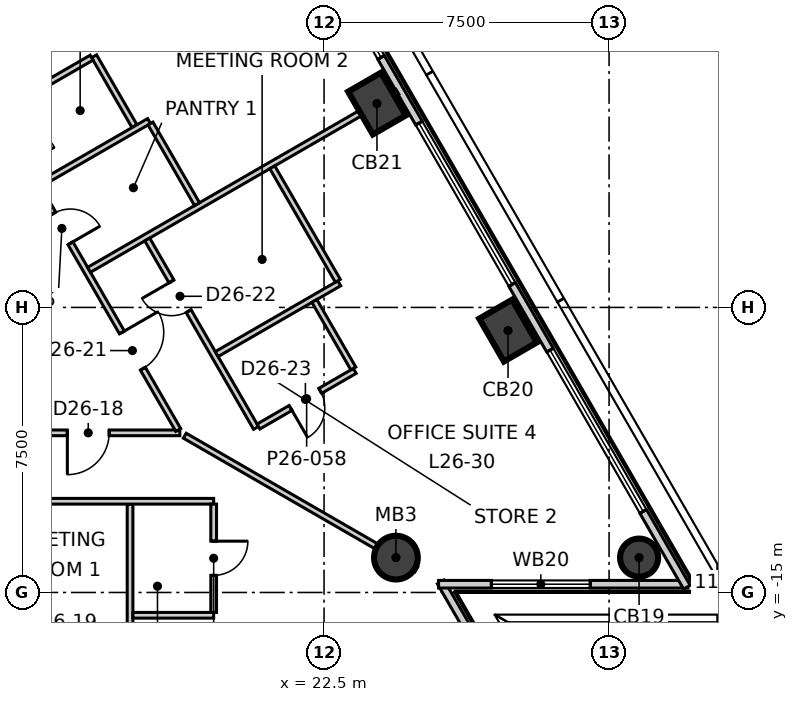
"""IFC4 building model, lengths in metres.
Left out: names, types, materials, properties, quantities, classifications, styles, units other than length and angle.
Written with IfcOpenShell. Run it as: python <this file> out.ifc"""

import sys

from ifc_helpers import new_model, si_unit, direction, frame, frame_2d, origin, origin_2d, place, context, subcontext, project, spatial, rectangle, circle, extrude, element, fill, save


model = new_model("IFC4")
c1 = context("Model", 3, precision=1e-05, world=origin(), true_north=direction((0.0, 1.0)))
c2 = subcontext(c1, "Body", "Model", "MODEL_VIEW")
j1 = project(units=[si_unit("LENGTHUNIT", "METRE"), si_unit("PLANEANGLEUNIT", "RADIAN")], contexts=[c1])
p1 = place(None, origin())
s1 = spatial("IfcSite", under=j1, at=p1, CompositionType="ELEMENT")
p2 = place(p1, origin())
s2 = spatial("IfcBuilding", under=s1, at=p2, CompositionType="ELEMENT")
p3 = place(p2, frame((0.0, 0.0, 116.3)))
s3 = spatial("IfcBuildingStorey", under=s2, at=p3, CompositionType="ELEMENT", Elevation=116.3)
p4 = place(p3, frame((30.79, -14.083, -0.3), z_axis=(0.0, 0.0, 1.0), x_axis=(-0.5, 0.866025403784, 0.0)))
e1 = element("IfcColumn", 1, at=p4, inside=s3, PredefinedType="COLUMN", context=c2, shape_type="SweptSolid", body=[
    extrude(circle(Radius=0.5, at=origin_2d()), origin(), (0.0, 0.0, 1.0), 4.0),
])
for number, where, z_axis, x_axis in (
    (2, (27.341, -8.109, -0.3), (0.0, 0.0, 1.0), (-0.5, 0.866, 0.0)),
    (3, (23.892, -2.136, -0.3), (0.0, 0.0, 1.0), (-0.5, 0.866, 0.0)),
):
    element("IfcColumn", number, at=place(p3, frame(where, z_axis=z_axis, x_axis=x_axis)), inside=s3, PredefinedType="COLUMN", context=c2, shape_type="SweptSolid", body=[
        extrude(rectangle(XDim=1.3, YDim=1.0, at=origin_2d()), origin(), (0.0, 0.0, 1.0), 4.0),
    ])
p5 = place(p3, frame((24.391, -14.083, -0.3), z_axis=(0.0, 0.0, 1.0), x_axis=(1.0, 0.0, 0.0)))
e4 = element("IfcColumn", 4, at=p5, inside=s3, PredefinedType="COLUMN", context=c2, shape_type="SweptSolid", body=[
    extrude(circle(Radius=0.575, at=origin_2d()), origin(), (0.0, 0.0, 1.0), 4.0),
])
p6 = place(p3, frame((28.849, -20.402, 0.0), z_axis=(0.0, 0.0, 1.0), x_axis=(-0.500066121085, 0.865987225393, 0.0)))
e5 = element("IfcWall", 5, at=p6, inside=s3, PredefinedType="ELEMENTEDWALL", context=c2, shape_type="SweptSolid", body=[
    extrude(rectangle(XDim=6.559, YDim=0.2, at=frame_2d((3.28, 0.0))), origin(), (0.0, 0.0, 1.0), 3.7),
])
p7 = place(p6, frame((1.99, 0.0, 0.9)))
e6 = element("IfcOpeningElement", 6, at=p7, cuts=e5, PredefinedType="OPENING", context=c2, shape_type="SweptSolid", body=[
    extrude(rectangle(XDim=2.6, YDim=2.5, at=frame_2d((1.3, 1.25))), frame((0.0, 0.11, 0.0), z_axis=(0.0, -1.0, 0.0), x_axis=(1.0, 0.0, 0.0)), (0.0, 0.0, 1.0), 0.22),
])
p8 = place(p3, frame((25.514, -14.783, 0.0), z_axis=(0.0, 0.0, 1.0), x_axis=(1.0, 0.0, 0.0)))
e7 = element("IfcWall", 7, at=p8, inside=s3, PredefinedType="ELEMENTEDWALL", context=c2, shape_type="SweptSolid", body=[
    extrude(rectangle(XDim=6.559, YDim=0.2, at=frame_2d((3.28, 0.0))), origin(), (0.0, 0.0, 1.0), 3.7),
])
p9 = place(p8, frame((1.39, 0.0, 0.9)))
e8 = element("IfcOpeningElement", 8, at=p9, cuts=e7, PredefinedType="OPENING", context=c2, shape_type="SweptSolid", body=[
    extrude(rectangle(XDim=2.6, YDim=2.5, at=frame_2d((1.3, 1.25))), frame((0.0, 0.11, 0.0), z_axis=(0.0, -1.0, 0.0), x_axis=(1.0, 0.0, 0.0)), (0.0, 0.0, 1.0), 0.22),
])
p10 = place(p3, frame((32.048, -14.861, 0.0), z_axis=(0.0, 0.0, 1.0), x_axis=(-0.499996704161, 0.866027306629, 0.0)))
e9 = element("IfcWall", 9, at=p10, inside=s3, PredefinedType="ELEMENTEDWALL", context=c2, shape_type="SweptSolid", body=[
    extrude(rectangle(XDim=57.769, YDim=0.2, at=frame_2d((28.884, 0.0))), origin(), (0.0, 0.0, 1.0), 3.7),
])
p11 = place(p10, frame((2.302, 0.0, 0.9)))
e10 = element("IfcOpeningElement", 10, at=p11, cuts=e9, PredefinedType="OPENING", context=c2, shape_type="SweptSolid", body=[
    extrude(rectangle(XDim=4.9, YDim=2.5, at=frame_2d((2.45, 1.25))), frame((0.0, 0.11, 0.0), z_axis=(0.0, -1.0, 0.0), x_axis=(1.0, 0.0, 0.0)), (0.0, 0.0, 1.0), 0.22),
])
p12 = place(p10, frame((9.199, 0.0, 0.9)))
e11 = element("IfcOpeningElement", 11, at=p12, cuts=e9, PredefinedType="OPENING", context=c2, shape_type="SweptSolid", body=[
    extrude(rectangle(XDim=4.9, YDim=2.5, at=frame_2d((2.45, 1.25))), frame((0.0, 0.11, 0.0), z_axis=(0.0, -1.0, 0.0), x_axis=(1.0, 0.0, 0.0)), (0.0, 0.0, 1.0), 0.22),
])
p13 = place(p10, frame((16.097, 0.0, 0.9)))
e12 = element("IfcOpeningElement", 12, at=p13, cuts=e9, PredefinedType="OPENING", context=c2, shape_type="SweptSolid", body=[
    extrude(rectangle(XDim=4.9, YDim=2.5, at=frame_2d((2.45, 1.25))), frame((0.0, 0.11, 0.0), z_axis=(0.0, -1.0, 0.0), x_axis=(1.0, 0.0, 0.0)), (0.0, 0.0, 1.0), 0.22),
])
p14 = place(p10, frame((22.995, 0.0, 0.9)))
e13 = element("IfcOpeningElement", 13, at=p14, cuts=e9, PredefinedType="OPENING", context=c2, shape_type="SweptSolid", body=[
    extrude(rectangle(XDim=4.9, YDim=2.5, at=frame_2d((2.45, 1.25))), frame((0.0, 0.11, 0.0), z_axis=(0.0, -1.0, 0.0), x_axis=(1.0, 0.0, 0.0)), (0.0, 0.0, 1.0), 0.22),
])
p15 = place(p10, frame((29.893, 0.0, 0.9)))
e14 = element("IfcOpeningElement", 14, at=p15, cuts=e9, PredefinedType="OPENING", context=c2, shape_type="SweptSolid", body=[
    extrude(rectangle(XDim=4.9, YDim=2.5, at=frame_2d((2.45, 1.25))), frame((0.0, 0.11, 0.0), z_axis=(0.0, -1.0, 0.0), x_axis=(1.0, 0.0, 0.0)), (0.0, 0.0, 1.0), 0.22),
])
p16 = place(p10, frame((36.791, 0.0, 0.9)))
e15 = element("IfcOpeningElement", 15, at=p16, cuts=e9, PredefinedType="OPENING", context=c2, shape_type="SweptSolid", body=[
    extrude(rectangle(XDim=4.9, YDim=2.5, at=frame_2d((2.45, 1.25))), frame((0.0, 0.11, 0.0), z_axis=(0.0, -1.0, 0.0), x_axis=(1.0, 0.0, 0.0)), (0.0, 0.0, 1.0), 0.22),
])
p17 = place(p10, frame((43.689, 0.0, 0.9)))
e16 = element("IfcOpeningElement", 16, at=p17, cuts=e9, PredefinedType="OPENING", context=c2, shape_type="SweptSolid", body=[
    extrude(rectangle(XDim=4.9, YDim=2.5, at=frame_2d((2.45, 1.25))), frame((0.0, 0.11, 0.0), z_axis=(0.0, -1.0, 0.0), x_axis=(1.0, 0.0, 0.0)), (0.0, 0.0, 1.0), 0.22),
])
p18 = place(p10, frame((50.587, 0.0, 0.9)))
e17 = element("IfcOpeningElement", 17, at=p18, cuts=e9, PredefinedType="OPENING", context=c2, shape_type="SweptSolid", body=[
    extrude(rectangle(XDim=4.9, YDim=2.5, at=frame_2d((2.45, 1.25))), frame((0.0, 0.11, 0.0), z_axis=(0.0, -1.0, 0.0), x_axis=(1.0, 0.0, 0.0)), (0.0, 0.0, 1.0), 0.22),
])
p19 = place(p3, frame((0.901, -10.8, 0.0), z_axis=(0.0, 0.0, 1.0), x_axis=(1.0, 0.0, 0.0)))
e18 = element("IfcWall", 18, at=p19, inside=s3, PredefinedType="PARTITIONING", context=c2, shape_type="SweptSolid", body=[
    extrude(rectangle(XDim=17.804, YDim=0.15, at=frame_2d((8.902, 0.0))), origin(), (0.0, 0.0, 1.0), 3.7),
])
p20 = place(p19, frame((5.849, 0.0, 0.0)))
e19 = element("IfcOpeningElement", 19, at=p20, cuts=e18, PredefinedType="OPENING", context=c2, shape_type="SweptSolid", body=[
    extrude(rectangle(XDim=1.1, YDim=2.1, at=frame_2d((0.55, 1.05))), frame((0.0, 0.085, 0.0), z_axis=(0.0, -1.0, 0.0), x_axis=(1.0, 0.0, 0.0)), (0.0, 0.0, 1.0), 0.17),
])
p21 = place(p19, frame((14.844, 0.0, 0.0)))
e20 = element("IfcOpeningElement", 20, at=p21, cuts=e18, PredefinedType="OPENING", context=c2, shape_type="SweptSolid", body=[
    extrude(rectangle(XDim=1.1, YDim=2.1, at=frame_2d((0.55, 1.05))), frame((0.0, 0.085, 0.0), z_axis=(0.0, -1.0, 0.0), x_axis=(1.0, 0.0, 0.0)), (0.0, 0.0, 1.0), 0.17),
])
p22 = place(p3, frame((9.803, 4.62, 0.0), z_axis=(0.0, 0.0, 1.0), x_axis=(0.500023004316, -0.866012121829, 0.0)))
e21 = element("IfcWall", 21, at=p22, inside=s3, PredefinedType="PARTITIONING", context=c2, shape_type="SweptSolid", body=[
    extrude(rectangle(XDim=17.719, YDim=0.15, at=frame_2d((8.86, 0.0))), origin(), (0.0, 0.0, 1.0), 3.7),
])
p23 = place(p22, frame((14.756, 0.0, 0.0)))
e22 = element("IfcOpeningElement", 22, at=p23, cuts=e21, PredefinedType="OPENING", context=c2, shape_type="SweptSolid", body=[
    extrude(rectangle(XDim=1.1, YDim=2.1, at=frame_2d((0.55, 1.05))), frame((0.0, 0.085, 0.0), z_axis=(0.0, -1.0, 0.0), x_axis=(1.0, 0.0, 0.0)), (0.0, 0.0, 1.0), 0.17),
])
p24 = place(p22, frame((4.645, 0.0, 0.0)))
e23 = element("IfcOpeningElement", 23, at=p24, cuts=e21, PredefinedType="OPENING", context=c2, shape_type="SweptSolid", body=[
    extrude(rectangle(XDim=1.1, YDim=2.1, at=frame_2d((0.55, 1.05))), frame((0.0, 0.085, 0.0), z_axis=(0.0, -1.0, 0.0), x_axis=(1.0, 0.0, 0.0)), (0.0, 0.0, 1.0), 0.17),
])
p25 = place(p22, frame((11.145, 0.0, 0.0)))
e24 = element("IfcOpeningElement", 24, at=p25, cuts=e21, PredefinedType="OPENING", context=c2, shape_type="SweptSolid", body=[
    extrude(rectangle(XDim=0.9, YDim=2.1, at=frame_2d((0.45, 1.05))), frame((0.0, 0.085, 0.0), z_axis=(0.0, -1.0, 0.0), x_axis=(1.0, 0.0, 0.0)), (0.0, 0.0, 1.0), 0.17),
])
p26 = place(p22, frame((8.745, 0.0, 0.0)))
e25 = element("IfcOpeningElement", 25, at=p26, cuts=e21, PredefinedType="OPENING", context=c2, shape_type="SweptSolid", body=[
    extrude(rectangle(XDim=0.9, YDim=2.1, at=frame_2d((0.45, 1.05))), frame((0.0, 0.085, 0.0), z_axis=(0.0, -1.0, 0.0), x_axis=(1.0, 0.0, 0.0)), (0.0, 0.0, 1.0), 0.17),
])
p27 = place(p3, frame((16.449, -0.891, 0.0), z_axis=(0.0, 0.0, 1.0), x_axis=(0.500266112279, -0.865871709265, 0.0)))
e26 = element("IfcWall", 26, at=p27, inside=s3, PredefinedType="PARTITIONING", context=c2, shape_type="SweptSolid", body=[
    extrude(rectangle(XDim=2.125, YDim=0.15, at=frame_2d((1.062, 0.0))), origin(), (0.0, 0.0, 1.0), 3.7),
])
p28 = place(p3, frame((13.916, -2.353, 0.0), z_axis=(0.0, 0.0, 1.0), x_axis=(0.866004402611, 0.500036373335, 0.0)))
e27 = element("IfcWall", 27, at=p28, inside=s3, PredefinedType="PARTITIONING", context=c2, shape_type="SweptSolid", body=[
    extrude(rectangle(XDim=2.85, YDim=0.15, at=frame_2d((1.425, 0.0))), origin(), (0.0, 0.0, 1.0), 3.7),
])
p29 = place(p3, frame((15.016, -4.258, 0.0), z_axis=(0.0, 0.0, 1.0), x_axis=(0.866029041019, 0.499993700073, 0.0)))
e28 = element("IfcWall", 28, at=p29, inside=s3, PredefinedType="PARTITIONING", context=c2, shape_type="SweptSolid", body=[
    extrude(rectangle(XDim=3.324, YDim=0.15, at=frame_2d((1.662, 0.0))), origin(), (0.0, 0.0, 1.0), 3.7),
])
p30 = place(p3, frame((16.316, -6.51, 0.0), z_axis=(0.0, 0.0, 1.0), x_axis=(0.866024577697, 0.500001430823, 0.0)))
e29 = element("IfcWall", 29, at=p30, inside=s3, PredefinedType="PARTITIONING", context=c2, shape_type="SweptSolid", body=[
    extrude(rectangle(XDim=9.368, YDim=0.15, at=frame_2d((4.684, 0.0))), origin(), (0.0, 0.0, 1.0), 3.7),
])
p31 = place(p3, frame((17.933, -2.661, 0.0), z_axis=(0.0, 0.0, 1.0), x_axis=(0.499900713578, -0.866082719239, 0.0)))
e30 = element("IfcWall", 30, at=p31, inside=s3, PredefinedType="PARTITIONING", context=c2, shape_type="SweptSolid", body=[
    extrude(rectangle(XDim=2.45, YDim=0.15, at=frame_2d((1.225, 0.0))), origin(), (0.0, 0.0, 1.0), 3.7),
])
p32 = place(p3, frame((18.835, -10.875, 0.0), z_axis=(0.0, 0.0, 1.0), x_axis=(0.866009336022, -0.500027829149, 0.0)))
e31 = element("IfcWall", 31, at=p32, inside=s3, PredefinedType="PARTITIONING", context=c2, shape_type="SweptSolid", body=[
    extrude(rectangle(XDim=7.036, YDim=0.15, at=frame_2d((3.518, 0.0))), origin(), (0.0, 0.0, 1.0), 3.15),
])
p33 = place(p3, frame((17.847, -5.712, 0.0), z_axis=(0.0, 0.0, 1.0), x_axis=(0.500069422629, -0.865985318901, 0.0)))
e32 = element("IfcWall", 32, at=p33, inside=s3, PredefinedType="PARTITIONING", context=c2, shape_type="SweptSolid", body=[
    extrude(rectangle(XDim=5.725, YDim=0.15, at=frame_2d((2.863, 0.0))), origin(), (0.0, 0.0, 1.0), 3.7),
])
p34 = place(p33, frame((1.276, 0.0, 0.0)))
e33 = element("IfcOpeningElement", 33, at=p34, cuts=e32, PredefinedType="OPENING", context=c2, shape_type="SweptSolid", body=[
    extrude(rectangle(XDim=0.9, YDim=2.1, at=frame_2d((0.45, 1.05))), frame((0.0, 0.085, 0.0), z_axis=(0.0, -1.0, 0.0), x_axis=(1.0, 0.0, 0.0)), (0.0, 0.0, 1.0), 0.17),
])
p35 = place(p3, frame((17.395, -16.325, 0.0), z_axis=(0.0, 0.0, 1.0), x_axis=(0.0, 1.0, 0.0)))
e34 = element("IfcWall", 34, at=p35, inside=s3, PredefinedType="PARTITIONING", context=c2, shape_type="SweptSolid", body=[
    extrude(rectangle(XDim=3.65, YDim=0.15, at=frame_2d((1.825, 0.0))), origin(), (0.0, 0.0, 1.0), 3.7),
])
p36 = place(p3, frame((13.87, -12.6, 0.0), z_axis=(0.0, 0.0, 1.0), x_axis=(1.0, 0.0, 0.0)))
e35 = element("IfcWall", 35, at=p36, inside=s3, PredefinedType="PARTITIONING", context=c2, shape_type="SweptSolid", body=[
    extrude(rectangle(XDim=5.725, YDim=0.15, at=frame_2d((2.862, 0.0))), origin(), (0.0, 0.0, 1.0), 3.7),
])
p37 = place(p3, frame((17.47, -15.6, 0.0), z_axis=(0.0, 0.0, 1.0), x_axis=(1.0, 0.0, 0.0)))
e36 = element("IfcWall", 36, at=p37, inside=s3, PredefinedType="PARTITIONING", context=c2, shape_type="SweptSolid", body=[
    extrude(rectangle(XDim=2.125, YDim=0.15, at=frame_2d((1.062, 0.0))), origin(), (0.0, 0.0, 1.0), 3.7),
])
p38 = place(p3, frame((19.595, -15.525, 0.0), z_axis=(0.0, 0.0, 1.0), x_axis=(0.0, 1.0, 0.0)))
e37 = element("IfcWall", 37, at=p38, inside=s3, PredefinedType="PARTITIONING", context=c2, shape_type="SweptSolid", body=[
    extrude(rectangle(XDim=2.85, YDim=0.15, at=frame_2d((1.425, 0.0))), origin(), (0.0, 0.0, 1.0), 3.7),
])
p39 = place(p38, frame((0.975, 0.0, 0.0)))
e38 = element("IfcOpeningElement", 38, at=p39, cuts=e37, PredefinedType="OPENING", context=c2, shape_type="SweptSolid", body=[
    extrude(rectangle(XDim=0.9, YDim=2.1, at=frame_2d((0.45, 1.05))), frame((0.0, 0.085, 0.0), z_axis=(0.0, -1.0, 0.0), x_axis=(1.0, 0.0, 0.0)), (0.0, 0.0, 1.0), 0.17),
])
p40 = place(p3, frame((19.675, -8.728, 0.0), z_axis=(0.0, 0.0, 1.0), x_axis=(0.865955274182, 0.500121448367, 0.0)))
e39 = element("IfcWall", 39, at=p40, inside=s3, PredefinedType="PARTITIONING", context=c2, shape_type="SweptSolid", body=[
    extrude(rectangle(XDim=3.725, YDim=0.15, at=frame_2d((1.863, 0.0))), origin(), (0.0, 0.0, 1.0), 3.7),
])
p41 = place(p3, frame((21.138, -3.812, 0.0), z_axis=(0.0, 0.0, 1.0), x_axis=(0.49998991961, -0.866031223622, 0.0)))
e40 = element("IfcWall", 40, at=p41, inside=s3, PredefinedType="PARTITIONING", context=c2, shape_type="SweptSolid", body=[
    extrude(rectangle(XDim=3.45, YDim=0.15, at=frame_2d((1.725, 0.0))), origin(), (0.0, 0.0, 1.0), 3.7),
])
p42 = place(p3, frame((20.775, -10.633, 0.0), z_axis=(0.0, 0.0, 1.0), x_axis=(0.865938168999, 0.50015106465, 0.0)))
e41 = element("IfcWall", 41, at=p42, inside=s3, PredefinedType="PARTITIONING", context=c2, shape_type="SweptSolid", body=[
    extrude(rectangle(XDim=2.925, YDim=0.15, at=frame_2d((1.463, 0.0))), origin(), (0.0, 0.0, 1.0), 3.7),
])
p43 = place(p42, frame((0.975, 0.0, 0.0)))
e42 = element("IfcOpeningElement", 42, at=p43, cuts=e41, PredefinedType="OPENING", context=c2, shape_type="SweptSolid", body=[
    extrude(rectangle(XDim=0.9, YDim=2.1, at=frame_2d((0.45, 1.05))), frame((0.0, 0.085, 0.0), z_axis=(0.0, -1.0, 0.0), x_axis=(1.0, 0.0, 0.0)), (0.0, 0.0, 1.0), 0.17),
])
p44 = place(p3, frame((22.245, -7.33, 0.0), z_axis=(0.0, 0.0, 1.0), x_axis=(0.499853014394, -0.866110249334, 0.0)))
e43 = element("IfcWall", 43, at=p44, inside=s3, PredefinedType="PARTITIONING", context=c2, shape_type="SweptSolid", body=[
    extrude(rectangle(XDim=2.05, YDim=0.15, at=frame_2d((1.025, 0.0))), origin(), (0.0, 0.0, 1.0), 3.7),
])
p45 = place(p9, origin())
e44 = element("IfcWindow", 44, at=p45, inside=s3, PartitioningType="SINGLE_PANEL", PredefinedType="WINDOW", context=c2, shape_type="SweptSolid", body=[
    extrude(rectangle(XDim=2.6, YDim=2.5, at=frame_2d((1.3, 1.25))), frame((0.0, 0.03, 0.0), z_axis=(0.0, -1.0, 0.0), x_axis=(1.0, 0.0, 0.0)), (0.0, 0.0, 1.0), 0.06),
])
fill(e8, e44)
p46 = place(p11, origin())
e45 = element("IfcWindow", 45, at=p46, inside=s3, PartitioningType="SINGLE_PANEL", PredefinedType="WINDOW", context=c2, shape_type="SweptSolid", body=[
    extrude(rectangle(XDim=4.9, YDim=2.5, at=frame_2d((2.45, 1.25))), frame((0.0, 0.03, 0.0), z_axis=(0.0, -1.0, 0.0), x_axis=(1.0, 0.0, 0.0)), (0.0, 0.0, 1.0), 0.06),
])
fill(e10, e45)
p47 = place(p12, origin())
e46 = element("IfcWindow", 46, at=p47, inside=s3, PartitioningType="SINGLE_PANEL", PredefinedType="WINDOW", context=c2, shape_type="SweptSolid", body=[
    extrude(rectangle(XDim=4.9, YDim=2.5, at=frame_2d((2.45, 1.25))), frame((0.0, 0.03, 0.0), z_axis=(0.0, -1.0, 0.0), x_axis=(1.0, 0.0, 0.0)), (0.0, 0.0, 1.0), 0.06),
])
fill(e11, e46)
p48 = place(p13, origin())
e47 = element("IfcWindow", 47, at=p48, inside=s3, PartitioningType="SINGLE_PANEL", PredefinedType="WINDOW", context=c2, shape_type="SweptSolid", body=[
    extrude(rectangle(XDim=4.9, YDim=2.5, at=frame_2d((2.45, 1.25))), frame((0.0, 0.03, 0.0), z_axis=(0.0, -1.0, 0.0), x_axis=(1.0, 0.0, 0.0)), (0.0, 0.0, 1.0), 0.06),
])
fill(e12, e47)
p49 = place(p21, origin())
e48 = element("IfcDoor", 48, at=p49, inside=s3, OperationType="SINGLE_SWING_LEFT", PredefinedType="DOOR", context=c2, shape_type="SweptSolid", body=[
    extrude(rectangle(XDim=1.1, YDim=2.1, at=frame_2d((0.55, 1.05))), frame((0.0, 0.025, 0.0), z_axis=(0.0, -1.0, 0.0), x_axis=(1.0, 0.0, 0.0)), (0.0, 0.0, 1.0), 0.05),
])
fill(e20, e48)
p50 = place(p39, origin())
e49 = element("IfcDoor", 49, at=p50, inside=s3, OperationType="SINGLE_SWING_RIGHT", PredefinedType="DOOR", context=c2, shape_type="SweptSolid", body=[
    extrude(rectangle(XDim=0.9, YDim=2.1, at=frame_2d((0.45, 1.05))), frame((0.0, 0.025, 0.0), z_axis=(0.0, -1.0, 0.0), x_axis=(1.0, 0.0, 0.0)), (0.0, 0.0, 1.0), 0.05),
])
fill(e38, e49)
p51 = place(p23, origin())
e50 = element("IfcDoor", 50, at=p51, inside=s3, OperationType="SINGLE_SWING_RIGHT", PredefinedType="DOOR", context=c2, shape_type="SweptSolid", body=[
    extrude(rectangle(XDim=1.1, YDim=2.1, at=frame_2d((0.55, 1.05))), frame((0.0, 0.025, 0.0), z_axis=(0.0, -1.0, 0.0), x_axis=(1.0, 0.0, 0.0)), (0.0, 0.0, 1.0), 0.05),
])
fill(e22, e50)
p52 = place(p34, origin())
e51 = element("IfcDoor", 51, at=p52, inside=s3, OperationType="SINGLE_SWING_LEFT", PredefinedType="DOOR", context=c2, shape_type="SweptSolid", body=[
    extrude(rectangle(XDim=0.9, YDim=2.1, at=frame_2d((0.45, 1.05))), frame((0.0, 0.025, 0.0), z_axis=(0.0, -1.0, 0.0), x_axis=(1.0, 0.0, 0.0)), (0.0, 0.0, 1.0), 0.05),
])
fill(e33, e51)
p53 = place(p43, origin())
e52 = element("IfcDoor", 52, at=p53, inside=s3, OperationType="SINGLE_SWING_LEFT", PredefinedType="DOOR", context=c2, shape_type="SweptSolid", body=[
    extrude(rectangle(XDim=0.9, YDim=2.1, at=frame_2d((0.45, 1.05))), frame((0.0, 0.025, 0.0), z_axis=(0.0, -1.0, 0.0), x_axis=(1.0, 0.0, 0.0)), (0.0, 0.0, 1.0), 0.05),
])
fill(e42, e52)
p54 = place(p25, origin())
e53 = element("IfcDoor", 53, at=p54, inside=s3, OperationType="SINGLE_SWING_LEFT", PredefinedType="DOOR", context=c2, shape_type="SweptSolid", body=[
    extrude(rectangle(XDim=0.9, YDim=2.1, at=frame_2d((0.45, 1.05))), frame((0.0, 0.025, 0.0), z_axis=(0.0, -1.0, 0.0), x_axis=(1.0, 0.0, 0.0)), (0.0, 0.0, 1.0), 0.05),
])
fill(e24, e53)
save(model, sys.argv[1])
